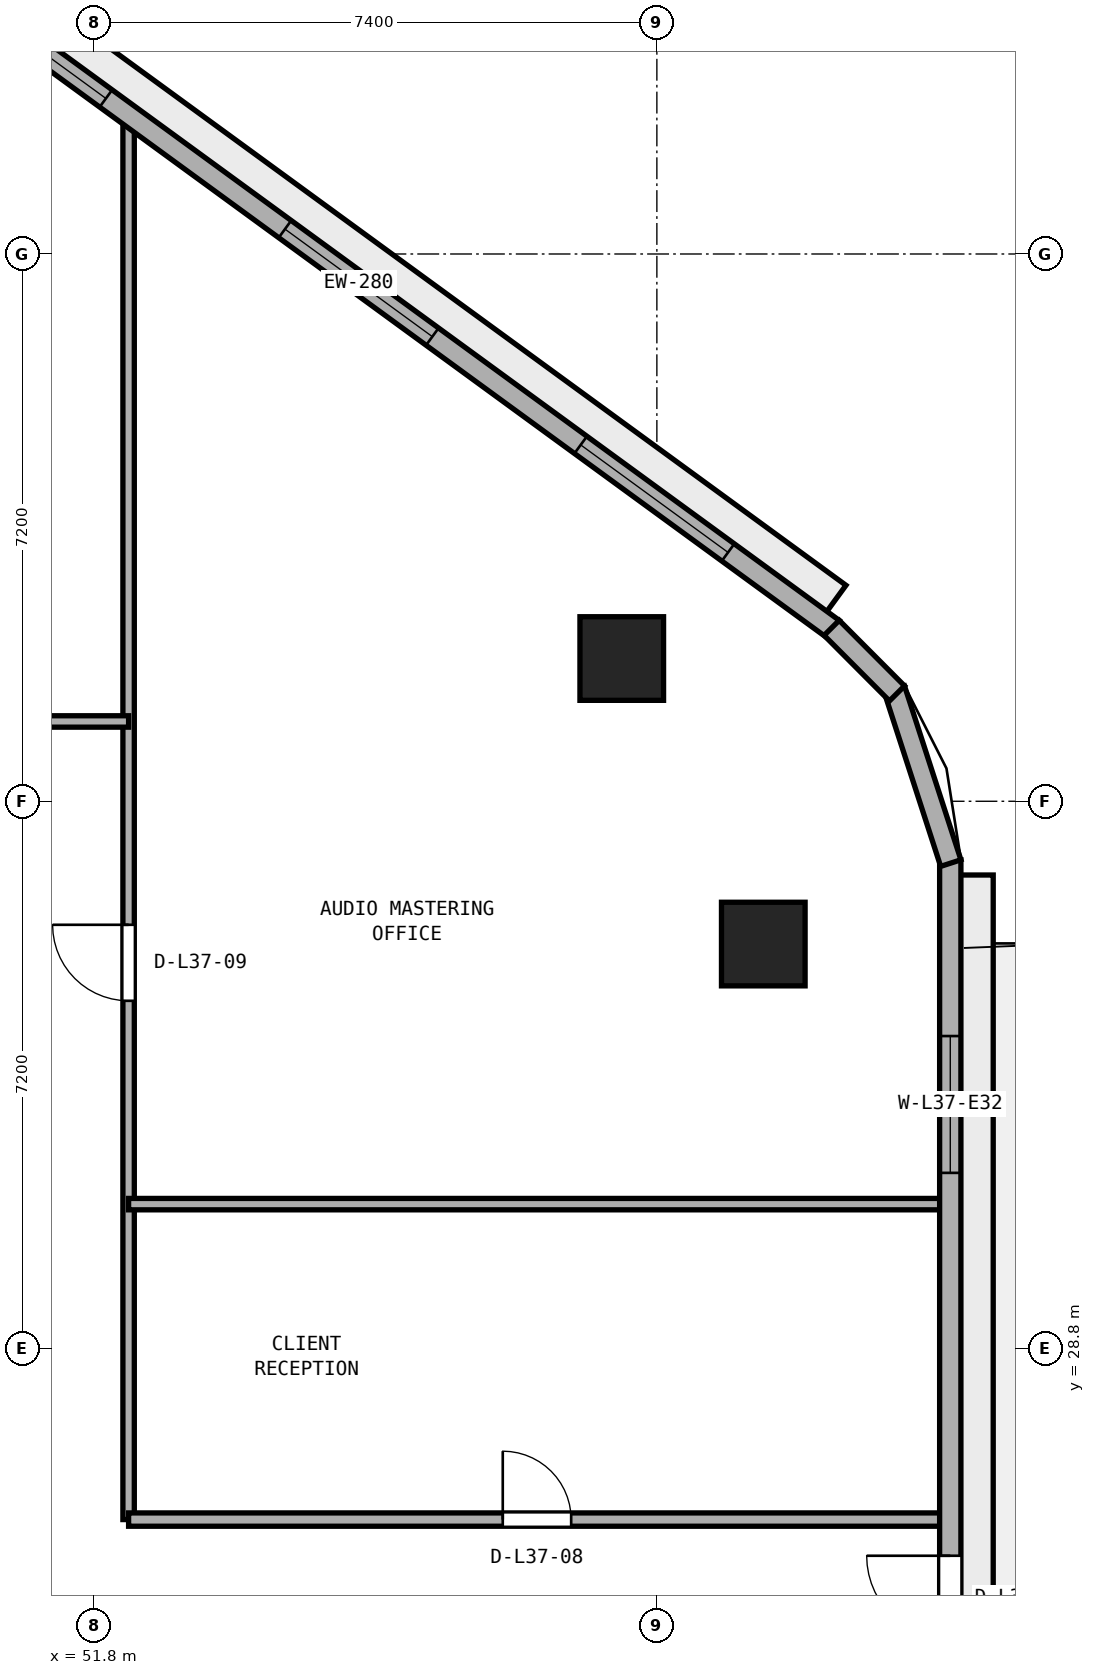
"""IFC4 building model, lengths in metres.
Left out: names, types, materials, properties, quantities, classifications, styles, units other than length and angle.
Written with IfcOpenShell. Run it as: python <this file> out.ifc"""

import sys

from ifc_helpers import new_model, si_unit, direction, frame, frame_2d, origin, origin_2d, place, context, subcontext, project, spatial, rectangle, extrude, element, fill, save


model = new_model("IFC4")
c1 = context("Model", 3, precision=1e-05, world=origin(), true_north=direction((0.0, 1.0)))
c2 = subcontext(c1, "Body", "Model", "MODEL_VIEW")
j1 = project(units=[si_unit("LENGTHUNIT", "METRE"), si_unit("PLANEANGLEUNIT", "RADIAN")], contexts=[c1])
p1 = place(None, origin())
s1 = spatial("IfcSite", under=j1, at=p1, CompositionType="ELEMENT")
p2 = place(p1, origin())
s2 = spatial("IfcBuilding", under=s1, at=p2, CompositionType="ELEMENT")
p3 = place(p2, frame((0.0, 0.0, 147.8)))
s3 = spatial("IfcBuildingStorey", under=s2, at=p3, CompositionType="ELEMENT", Elevation=147.8)
for number, where, z_axis, x_axis in (
    (1, (60.6, 34.122, 0.0), (0.0, 0.0, 1.0), (1.0, 0.0, 0.0)),
    (2, (58.738, 37.878, 0.0), (0.0, 0.0, 1.0), (1.0, 0.0, 0.0)),
):
    element("IfcColumn", number, at=place(p3, frame(where, z_axis=z_axis, x_axis=x_axis)), inside=s3, PredefinedType="COLUMN", context=c2, shape_type="SweptSolid", body=[
        extrude(rectangle(XDim=1.1, YDim=1.1, at=origin_2d()), origin(), (0.0, 0.0, 1.0), 3.8),
    ])
p4 = place(p3, frame((52.25, 26.55, 0.0), z_axis=(0.0, 0.0, 1.0), x_axis=(0.0, 1.0, 0.0)))
e3 = element("IfcWall", 3, at=p4, inside=s3, PredefinedType="PARTITIONING", context=c2, shape_type="SweptSolid", body=[
    extrude(rectangle(XDim=18.512, YDim=0.15, at=frame_2d((9.256, 0.0))), origin(), (0.0, 0.0, 1.0), 3.54),
])
p5 = place(p4, frame((6.825, 0.0, 0.0)))
e4 = element("IfcOpeningElement", 4, at=p5, cuts=e3, PredefinedType="OPENING", context=c2, shape_type="SweptSolid", body=[
    extrude(rectangle(XDim=1.0, YDim=2.12, at=frame_2d((0.5, 1.06))), frame((0.0, 0.085, 0.0), z_axis=(0.0, -1.0, 0.0), x_axis=(1.0, 0.0, 0.0)), (0.0, 0.0, 1.0), 0.17),
])
p6 = place(p3, frame((52.25, 26.55, 0.0), z_axis=(0.0, 0.0, 1.0), x_axis=(1.0, 0.0, 0.0)))
e5 = element("IfcWall", 5, at=p6, inside=s3, PredefinedType="PARTITIONING", context=c2, shape_type="SweptSolid", body=[
    extrude(rectangle(XDim=10.745, YDim=0.175, at=frame_2d((5.373, 0.0))), origin(), (0.0, 0.0, 1.0), 3.54),
])
p7 = place(p6, frame((4.923, 0.0, 0.0)))
e6 = element("IfcOpeningElement", 6, at=p7, cuts=e5, PredefinedType="OPENING", context=c2, shape_type="SweptSolid", body=[
    extrude(rectangle(XDim=0.9, YDim=2.1, at=frame_2d((0.45, 1.05))), frame((0.0, 0.097, 0.0), z_axis=(0.0, -1.0, 0.0), x_axis=(1.0, 0.0, 0.0)), (0.0, 0.0, 1.0), 0.195),
])
p8 = place(p3, frame((52.25, 30.7, 0.0), z_axis=(0.0, 0.0, 1.0), x_axis=(1.0, 0.0, 0.0)))
e7 = element("IfcWall", 7, at=p8, inside=s3, PredefinedType="PARTITIONING", context=c2, shape_type="SweptSolid", body=[
    extrude(rectangle(XDim=10.745, YDim=0.15, at=frame_2d((5.373, 0.0))), origin(), (0.0, 0.0, 1.0), 3.54),
])
p9 = place(p3, frame((21.75, 37.05, 0.0), z_axis=(0.0, 0.0, 1.0), x_axis=(1.0, 0.0, 0.0)))
e8 = element("IfcWall", 8, at=p9, inside=s3, PredefinedType="PARTITIONING", context=c2, shape_type="SweptSolid", body=[
    extrude(rectangle(XDim=30.5, YDim=0.15, at=frame_2d((15.25, 0.0))), origin(), (0.0, 0.0, 1.0), 3.54),
])
p10 = place(p9, frame((7.895, 0.0, 0.0)))
e9 = element("IfcOpeningElement", 9, at=p10, cuts=e8, PredefinedType="OPENING", context=c2, shape_type="SweptSolid", body=[
    extrude(rectangle(XDim=1.0, YDim=2.12, at=frame_2d((0.5, 1.06))), frame((0.0, 0.085, 0.0), z_axis=(0.0, -1.0, 0.0), x_axis=(1.0, 0.0, 0.0)), (0.0, 0.0, 1.0), 0.17),
])
p11 = place(p9, frame((22.905, 0.0, 0.0)))
e10 = element("IfcOpeningElement", 10, at=p11, cuts=e8, PredefinedType="OPENING", context=c2, shape_type="SweptSolid", body=[
    extrude(rectangle(XDim=1.0, YDim=2.12, at=frame_2d((0.5, 1.06))), frame((0.0, 0.085, 0.0), z_axis=(0.0, -1.0, 0.0), x_axis=(1.0, 0.0, 0.0)), (0.0, 0.0, 1.0), 0.17),
])
p12 = place(p3, frame((63.06, 16.418, 0.0), z_axis=(0.0, 0.0, 1.0), x_axis=(0.0, 1.0, 0.0)))
e11 = element("IfcWall", 11, at=p12, inside=s3, PredefinedType="STANDARD", context=c2, shape_type="SweptSolid", body=[
    extrude(rectangle(XDim=18.812, YDim=0.28, at=frame_2d((9.406, 0.0))), origin(), (0.0, 0.0, 1.0), 2.79),
])
p13 = place(p12, frame((8.556, 0.0, 0.0)))
e12 = element("IfcOpeningElement", 12, at=p13, cuts=e11, PredefinedType="OPENING", context=c2, shape_type="SweptSolid", body=[
    extrude(rectangle(XDim=1.1, YDim=2.2, at=frame_2d((0.55, 1.1))), frame((0.0, 0.15, 0.0), z_axis=(0.0, -1.0, 0.0), x_axis=(1.0, 0.0, 0.0)), (0.0, 0.0, 1.0), 0.3),
])
p14 = place(p12, frame((2.569, 0.0, 0.85)))
e13 = element("IfcOpeningElement", 13, at=p14, cuts=e11, PredefinedType="OPENING", context=c2, shape_type="SweptSolid", body=[
    extrude(rectangle(XDim=1.8, YDim=1.2, at=frame_2d((0.9, 0.6))), frame((0.0, 0.15, 0.0), z_axis=(0.0, -1.0, 0.0), x_axis=(1.0, 0.0, 0.0)), (0.0, 0.0, 1.0), 0.3),
])
p15 = place(p12, frame((14.693, 0.0, 0.85)))
e14 = element("IfcOpeningElement", 14, at=p15, cuts=e11, PredefinedType="OPENING", context=c2, shape_type="SweptSolid", body=[
    extrude(rectangle(XDim=1.8, YDim=1.2, at=frame_2d((0.9, 0.6))), frame((0.0, 0.15, 0.0), z_axis=(0.0, -1.0, 0.0), x_axis=(1.0, 0.0, 0.0)), (0.0, 0.0, 1.0), 0.3),
])
p16 = place(p3, frame((61.516, 38.267, 0.0), z_axis=(0.0, 0.0, 1.0), x_axis=(-0.807812505785, 0.589439526582, 0.0)))
e15 = element("IfcWall", 15, at=p16, inside=s3, PredefinedType="STANDARD", context=c2, shape_type="SweptSolid", body=[
    extrude(rectangle(XDim=15.448, YDim=0.28, at=frame_2d((7.724, 0.0))), origin(), (0.0, 0.0, 1.0), 3.54),
])
p17 = place(p16, frame((1.708, 0.0, 0.9)))
e16 = element("IfcOpeningElement", 16, at=p17, cuts=e15, PredefinedType="OPENING", context=c2, shape_type="SweptSolid", body=[
    extrude(rectangle(XDim=2.4, YDim=1.75, at=frame_2d((1.2, 0.875))), frame((0.0, 0.15, 0.0), z_axis=(0.0, -1.0, 0.0), x_axis=(1.0, 0.0, 0.0)), (0.0, 0.0, 1.0), 0.3),
])
p18 = place(p16, frame((6.524, 0.0, 0.9)))
e17 = element("IfcOpeningElement", 17, at=p18, cuts=e15, PredefinedType="OPENING", context=c2, shape_type="SweptSolid", body=[
    extrude(rectangle(XDim=2.4, YDim=1.75, at=frame_2d((1.2, 0.875))), frame((0.0, 0.15, 0.0), z_axis=(0.0, -1.0, 0.0), x_axis=(1.0, 0.0, 0.0)), (0.0, 0.0, 1.0), 0.3),
])
p19 = place(p16, frame((11.84, 0.0, 0.9)))
e18 = element("IfcOpeningElement", 18, at=p19, cuts=e15, PredefinedType="OPENING", context=c2, shape_type="SweptSolid", body=[
    extrude(rectangle(XDim=2.4, YDim=1.75, at=frame_2d((1.2, 0.875))), frame((0.0, 0.15, 0.0), z_axis=(0.0, -1.0, 0.0), x_axis=(1.0, 0.0, 0.0)), (0.0, 0.0, 1.0), 0.3),
])
p20 = place(p3, frame((63.067, 35.187, 0.0), z_axis=(0.0, 0.0, 1.0), x_axis=(-0.308390504294, 0.951259847182, 0.0)))
e19 = element("IfcWall", 19, at=p20, inside=s3, PredefinedType="STANDARD", context=c2, shape_type="SweptSolid", body=[
    extrude(rectangle(XDim=2.405, YDim=0.28, at=frame_2d((1.203, 0.0))), origin(), (0.0, 0.0, 1.0), 3.54),
])
p21 = place(p3, frame((62.359, 37.419, 0.0), z_axis=(0.0, 0.0, 1.0), x_axis=(-0.706003104649, 0.708208737751, 0.0)))
e20 = element("IfcWall", 20, at=p21, inside=s3, PredefinedType="STANDARD", context=c2, shape_type="SweptSolid", body=[
    extrude(rectangle(XDim=1.218, YDim=0.28, at=frame_2d((0.609, 0.0))), origin(), (0.0, 0.0, 1.0), 3.54),
])
p22 = place(p7, origin())
e21 = element("IfcDoor", 21, at=p22, inside=s3, OperationType="SINGLE_SWING_LEFT", PredefinedType="DOOR", context=c2, shape_type="SweptSolid", body=[
    extrude(rectangle(XDim=0.9, YDim=2.1, at=frame_2d((0.45, 1.05))), frame((0.0, 0.025, 0.0), z_axis=(0.0, -1.0, 0.0), x_axis=(1.0, 0.0, 0.0)), (0.0, 0.0, 1.0), 0.05),
])
fill(e6, e21)
p23 = place(p5, origin())
e22 = element("IfcDoor", 22, at=p23, inside=s3, OperationType="SINGLE_SWING_RIGHT", PredefinedType="DOOR", context=c2, shape_type="SweptSolid", body=[
    extrude(rectangle(XDim=1.0, YDim=2.12, at=frame_2d((0.5, 1.06))), frame((0.0, 0.025, 0.0), z_axis=(0.0, -1.0, 0.0), x_axis=(1.0, 0.0, 0.0)), (0.0, 0.0, 1.0), 0.05),
])
fill(e4, e22)
p24 = place(p13, origin())
e23 = element("IfcDoor", 23, at=p24, inside=s3, OperationType="SINGLE_SWING_RIGHT", PredefinedType="DOOR", context=c2, shape_type="SweptSolid", body=[
    extrude(rectangle(XDim=1.1, YDim=2.2, at=frame_2d((0.55, 1.1))), frame((0.0, 0.025, 0.0), z_axis=(0.0, -1.0, 0.0), x_axis=(1.0, 0.0, 0.0)), (0.0, 0.0, 1.0), 0.05),
])
fill(e12, e23)
p25 = place(p15, origin())
e24 = element("IfcWindow", 24, at=p25, inside=s3, PartitioningType="SINGLE_PANEL", PredefinedType="WINDOW", context=c2, shape_type="SweptSolid", body=[
    extrude(rectangle(XDim=1.8, YDim=1.2, at=frame_2d((0.9, 0.6))), frame((0.0, 0.03, 0.0), z_axis=(0.0, -1.0, 0.0), x_axis=(1.0, 0.0, 0.0)), (0.0, 0.0, 1.0), 0.06),
])
fill(e14, e24)
p26 = place(p17, origin())
e25 = element("IfcWindow", 25, at=p26, inside=s3, PartitioningType="SINGLE_PANEL", PredefinedType="WINDOW", context=c2, shape_type="SweptSolid", body=[
    extrude(rectangle(XDim=2.4, YDim=1.75, at=frame_2d((1.2, 0.875))), frame((0.0, 0.03, 0.0), z_axis=(0.0, -1.0, 0.0), x_axis=(1.0, 0.0, 0.0)), (0.0, 0.0, 1.0), 0.06),
])
fill(e16, e25)
p27 = place(p18, origin())
e26 = element("IfcWindow", 26, at=p27, inside=s3, PartitioningType="SINGLE_PANEL", PredefinedType="WINDOW", context=c2, shape_type="SweptSolid", body=[
    extrude(rectangle(XDim=2.4, YDim=1.75, at=frame_2d((1.2, 0.875))), frame((0.0, 0.03, 0.0), z_axis=(0.0, -1.0, 0.0), x_axis=(1.0, 0.0, 0.0)), (0.0, 0.0, 1.0), 0.06),
])
fill(e17, e26)
p28 = place(p19, origin())
e27 = element("IfcWindow", 27, at=p28, inside=s3, PartitioningType="SINGLE_PANEL", PredefinedType="WINDOW", context=c2, shape_type="SweptSolid", body=[
    extrude(rectangle(XDim=2.4, YDim=1.75, at=frame_2d((1.2, 0.875))), frame((0.0, 0.03, 0.0), z_axis=(0.0, -1.0, 0.0), x_axis=(1.0, 0.0, 0.0)), (0.0, 0.0, 1.0), 0.06),
])
fill(e18, e27)
save(model, sys.argv[1])
